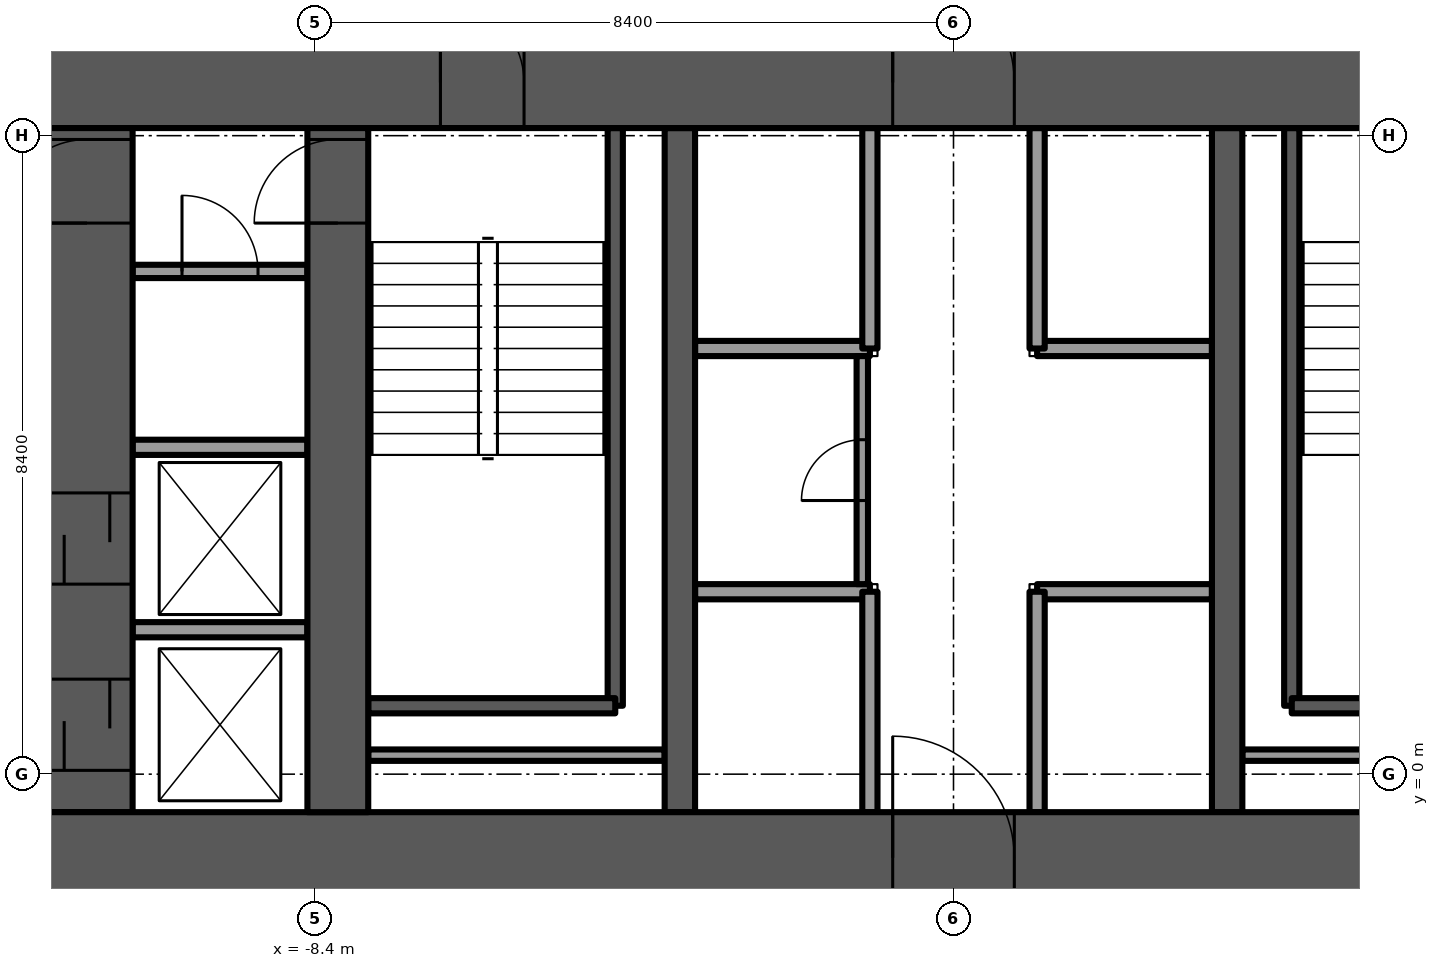
"""IFC4 building model, lengths in metres.
Left out: names, types, materials, properties, quantities, classifications, styles, units other than length and angle.
Written with IfcOpenShell. Run it as: python <this file> out.ifc"""

import sys

from ifc_helpers import new_model, si_unit, direction, frame, frame_2d, origin, place, context, subcontext, project, spatial, rectangle, extrude, element, fill, save


model = new_model("IFC4")
c1 = context("Model", 3, precision=1e-05, world=origin(), true_north=direction((0.0, 1.0)))
c2 = subcontext(c1, "Body", "Model", "MODEL_VIEW")
j1 = project(units=[si_unit("LENGTHUNIT", "METRE"), si_unit("PLANEANGLEUNIT", "RADIAN")], contexts=[c1])
p1 = place(None, origin())
s1 = spatial("IfcSite", under=j1, at=p1, CompositionType="ELEMENT")
p2 = place(p1, origin())
s2 = spatial("IfcBuilding", under=s1, at=p2, CompositionType="ELEMENT")
p3 = place(p2, frame((0.0, 0.0, 61.75)))
s3 = spatial("IfcBuildingStorey", under=s2, at=p3, CompositionType="ELEMENT", Elevation=61.75)
p4 = place(p3, frame((-12.0, -1.1, -0.3), z_axis=(0.0, 0.0, 1.0), x_axis=(1.0, 0.0, 0.0)))
e1 = element("IfcWall", 1, at=p4, inside=s3, PredefinedType="SHEAR", context=c2, shape_type="SweptSolid", body=[
    extrude(rectangle(XDim=24.0, YDim=1.2, at=frame_2d((12.0, 0.0))), origin(), (0.0, 0.0, 1.0), 3.75),
])
p5 = place(p4, frame((11.2, 0.0, 0.0)))
e2 = element("IfcOpeningElement", 2, at=p5, cuts=e1, PredefinedType="OPENING", context=c2, shape_type="SweptSolid", body=[
    extrude(rectangle(XDim=1.6, YDim=2.1, at=frame_2d((0.8, 1.05))), frame((0.0, 0.6, 0.0), z_axis=(0.0, -1.0, 0.0), x_axis=(1.0, 0.0, 0.0)), (0.0, 0.0, 1.0), 1.2),
])
p6 = place(p3, frame((-12.0, 9.1, -0.3), z_axis=(0.0, 0.0, 1.0), x_axis=(1.0, 0.0, 0.0)))
e3 = element("IfcWall", 3, at=p6, inside=s3, PredefinedType="SHEAR", context=c2, shape_type="SweptSolid", body=[
    extrude(rectangle(XDim=24.0, YDim=1.2, at=frame_2d((12.0, 0.0))), origin(), (0.0, 0.0, 1.0), 3.75),
])
p7 = place(p6, frame((11.2, 0.0, 0.0)))
e4 = element("IfcOpeningElement", 4, at=p7, cuts=e3, PredefinedType="OPENING", context=c2, shape_type="SweptSolid", body=[
    extrude(rectangle(XDim=1.6, YDim=2.1, at=frame_2d((0.8, 1.05))), frame((0.0, 0.6, 0.0), z_axis=(0.0, -1.0, 0.0), x_axis=(1.0, 0.0, 0.0)), (0.0, 0.0, 1.0), 1.2),
])
p8 = place(p6, frame((5.25, 0.0, 0.0)))
e5 = element("IfcOpeningElement", 5, at=p8, cuts=e3, PredefinedType="OPENING", context=c2, shape_type="SweptSolid", body=[
    extrude(rectangle(XDim=1.1, YDim=2.1, at=frame_2d((0.55, 1.05))), frame((0.0, 0.6, 0.0), z_axis=(0.0, -1.0, 0.0), x_axis=(1.0, 0.0, 0.0)), (0.0, 0.0, 1.0), 1.2),
])
p9 = place(p6, frame((17.65, 0.0, 0.0)))
e6 = element("IfcOpeningElement", 6, at=p9, cuts=e3, PredefinedType="OPENING", context=c2, shape_type="SweptSolid", body=[
    extrude(rectangle(XDim=1.1, YDim=2.1, at=frame_2d((0.55, 1.05))), frame((0.0, 0.6, 0.0), z_axis=(0.0, -1.0, 0.0), x_axis=(1.0, 0.0, 0.0)), (0.0, 0.0, 1.0), 1.2),
])
p10 = place(p3, frame((-8.1, -0.5, -0.3), z_axis=(0.0, 0.0, 1.0), x_axis=(0.0, 1.0, 0.0)))
e7 = element("IfcWall", 7, at=p10, inside=s3, PredefinedType="SHEAR", context=c2, shape_type="SweptSolid", body=[
    extrude(rectangle(XDim=9.0, YDim=0.8, at=frame_2d((4.5, 0.0))), origin(), (0.0, 0.0, 1.0), 3.75),
])
p11 = place(p10, frame((7.75, 0.0, 0.0)))
e8 = element("IfcOpeningElement", 8, at=p11, cuts=e7, PredefinedType="OPENING", context=c2, shape_type="SweptSolid", body=[
    extrude(rectangle(XDim=1.1, YDim=2.1, at=frame_2d((0.55, 1.05))), frame((0.0, 0.4, 0.0), z_axis=(0.0, -1.0, 0.0), x_axis=(1.0, 0.0, 0.0)), (0.0, 0.0, 1.0), 0.8),
])
for number, where, z_axis, x_axis in (
    (9, (-3.6, -0.5, -0.3), (0.0, 0.0, 1.0), (0.0, 1.0, 0.0)),
    (10, (3.6, -0.5, -0.3), (0.0, 0.0, 1.0), (0.0, 1.0, 0.0)),
):
    element("IfcWall", number, at=place(p3, frame(where, z_axis=z_axis, x_axis=x_axis)), inside=s3, PredefinedType="SHEAR", context=c2, shape_type="SweptSolid", body=[
        extrude(rectangle(XDim=9.0, YDim=0.4, at=frame_2d((4.5, 0.0))), origin(), (0.0, 0.0, 1.0), 3.75),
    ])
p12 = place(p3, frame((-11.4, -0.5, -0.3), z_axis=(0.0, 0.0, 1.0), x_axis=(0.0, 1.0, 0.0)))
e11 = element("IfcWall", 11, at=p12, inside=s3, PredefinedType="SHEAR", context=c2, shape_type="SweptSolid", body=[
    extrude(rectangle(XDim=9.0, YDim=1.2, at=frame_2d((4.5, 0.0))), origin(), (0.0, 0.0, 1.0), 3.75),
])
p13 = place(p12, frame((7.75, 0.0, 0.0)))
e12 = element("IfcOpeningElement", 12, at=p13, cuts=e11, PredefinedType="OPENING", context=c2, shape_type="SweptSolid", body=[
    extrude(rectangle(XDim=1.1, YDim=2.1, at=frame_2d((0.55, 1.05))), frame((0.0, 0.6, 0.0), z_axis=(0.0, -1.0, 0.0), x_axis=(1.0, 0.0, 0.0)), (0.0, 0.0, 1.0), 1.2),
])
p14 = place(p12, frame((0.55, 0.0, 0.0)))
e13 = element("IfcOpeningElement", 13, at=p14, cuts=e11, PredefinedType="OPENING", context=c2, shape_type="SweptSolid", body=[
    extrude(rectangle(XDim=1.2, YDim=2.1, at=frame_2d((0.6, 1.05))), frame((0.0, 0.6, 0.0), z_axis=(0.0, -1.0, 0.0), x_axis=(1.0, 0.0, 0.0)), (0.0, 0.0, 1.0), 1.2),
])
p15 = place(p12, frame((3.0, 0.0, 0.0)))
e14 = element("IfcOpeningElement", 14, at=p15, cuts=e11, PredefinedType="OPENING", context=c2, shape_type="SweptSolid", body=[
    extrude(rectangle(XDim=1.2, YDim=2.1, at=frame_2d((0.6, 1.05))), frame((0.0, 0.6, 0.0), z_axis=(0.0, -1.0, 0.0), x_axis=(1.0, 0.0, 0.0)), (0.0, 0.0, 1.0), 1.2),
])
p16 = place(p3, frame((-8.709, 20.292, 0.0), z_axis=(0.0, 0.0, 1.0), x_axis=(-0.500005515081, -0.866022219628, 0.0)))
e15 = element("IfcWall", 15, at=p16, inside=s3, PredefinedType="SOLIDWALL", context=c2, shape_type="SweptSolid", body=[
    extrude(rectangle(XDim=23.667, YDim=0.15, at=frame_2d((11.833, 0.0))), origin(), (0.0, 0.0, 1.0), 3.45),
])
p17 = place(p16, frame((3.825, 0.0, 0.15)))
e16 = element("IfcOpeningElement", 16, at=p17, cuts=e15, PredefinedType="OPENING", context=c2, shape_type="SweptSolid", body=[
    extrude(rectangle(XDim=1.5, YDim=2.85, at=frame_2d((0.75, 1.425))), frame((0.0, 0.075, 0.0), z_axis=(0.0, -1.0, 0.0), x_axis=(1.0, 0.0, 0.0)), (0.0, 0.0, 1.0), 0.15),
])
p18 = place(p16, frame((7.219, 0.0, 0.15)))
e17 = element("IfcOpeningElement", 17, at=p18, cuts=e15, PredefinedType="OPENING", context=c2, shape_type="SweptSolid", body=[
    extrude(rectangle(XDim=0.9, YDim=2.85, at=frame_2d((0.45, 1.425))), frame((0.0, 0.075, 0.0), z_axis=(0.0, -1.0, 0.0), x_axis=(1.0, 0.0, 0.0)), (0.0, 0.0, 1.0), 0.15),
])
p19 = place(p16, frame((8.254, 0.0, 0.15)))
e18 = element("IfcOpeningElement", 18, at=p19, cuts=e15, PredefinedType="OPENING", context=c2, shape_type="SweptSolid", body=[
    extrude(rectangle(XDim=1.5, YDim=2.85, at=frame_2d((0.75, 1.425))), frame((0.0, 0.075, 0.0), z_axis=(0.0, -1.0, 0.0), x_axis=(1.0, 0.0, 0.0)), (0.0, 0.0, 1.0), 0.15),
])
p20 = place(p16, frame((11.419, 0.0, 0.15)))
e19 = element("IfcOpeningElement", 19, at=p20, cuts=e15, PredefinedType="OPENING", context=c2, shape_type="SweptSolid", body=[
    extrude(rectangle(XDim=1.8, YDim=2.85, at=frame_2d((0.9, 1.425))), frame((0.0, 0.075, 0.0), z_axis=(0.0, -1.0, 0.0), x_axis=(1.0, 0.0, 0.0)), (0.0, 0.0, 1.0), 0.15),
])
p21 = place(p16, frame((13.519, 0.0, 0.15)))
e20 = element("IfcOpeningElement", 20, at=p21, cuts=e15, PredefinedType="OPENING", context=c2, shape_type="SweptSolid", body=[
    extrude(rectangle(XDim=1.5, YDim=2.85, at=frame_2d((0.75, 1.425))), frame((0.0, 0.075, 0.0), z_axis=(0.0, -1.0, 0.0), x_axis=(1.0, 0.0, 0.0)), (0.0, 0.0, 1.0), 0.15),
])
p22 = place(p16, frame((15.63, 0.0, 0.0)))
e21 = element("IfcOpeningElement", 21, at=p22, cuts=e15, PredefinedType="OPENING", context=c2, shape_type="SweptSolid", body=[
    extrude(rectangle(XDim=1.5, YDim=2.4, at=frame_2d((0.75, 1.2))), frame((0.0, 0.075, 0.0), z_axis=(0.0, -1.0, 0.0), x_axis=(1.0, 0.0, 0.0)), (0.0, 0.0, 1.0), 0.15),
])
p23 = place(p16, frame((0.41, 0.0, 0.15)))
e22 = element("IfcOpeningElement", 22, at=p23, cuts=e15, PredefinedType="OPENING", context=c2, shape_type="SweptSolid", body=[
    extrude(rectangle(XDim=1.8, YDim=2.73, at=frame_2d((0.9, 1.365))), frame((0.0, 0.075, 0.0), z_axis=(0.0, -1.0, 0.0), x_axis=(1.0, 0.0, 0.0)), (0.0, 0.0, 1.0), 0.15),
])
p24 = place(p16, frame((20.743, 0.0, 0.15)))
e23 = element("IfcOpeningElement", 23, at=p24, cuts=e15, PredefinedType="OPENING", context=c2, shape_type="SweptSolid", body=[
    extrude(rectangle(XDim=1.8, YDim=2.73, at=frame_2d((0.9, 1.365))), frame((0.0, 0.075, 0.0), z_axis=(0.0, -1.0, 0.0), x_axis=(1.0, 0.0, 0.0)), (0.0, 0.0, 1.0), 0.15),
])
p25 = place(p3, frame((-20.543, -1.269, 0.0), z_axis=(0.0, 0.0, 1.0), x_axis=(0.499995095024, -0.866028235655, 0.0)))
e24 = element("IfcWall", 24, at=p25, inside=s3, PredefinedType="SOLIDWALL", context=c2, shape_type="SweptSolid", body=[
    extrude(rectangle(XDim=18.345, YDim=0.15, at=frame_2d((9.172, 0.0))), origin(), (0.0, 0.0, 1.0), 3.45),
])
p26 = place(p25, frame((1.073, 0.0, 0.15)))
e25 = element("IfcOpeningElement", 25, at=p26, cuts=e24, PredefinedType="OPENING", context=c2, shape_type="SweptSolid", body=[
    extrude(rectangle(XDim=0.9, YDim=2.85, at=frame_2d((0.45, 1.425))), frame((0.0, 0.075, 0.0), z_axis=(0.0, -1.0, 0.0), x_axis=(1.0, 0.0, 0.0)), (0.0, 0.0, 1.0), 0.15),
])
p27 = place(p25, frame((3.172, 0.0, 0.15)))
e26 = element("IfcOpeningElement", 26, at=p27, cuts=e24, PredefinedType="OPENING", context=c2, shape_type="SweptSolid", body=[
    extrude(rectangle(XDim=1.5, YDim=2.85, at=frame_2d((0.75, 1.425))), frame((0.0, 0.075, 0.0), z_axis=(0.0, -1.0, 0.0), x_axis=(1.0, 0.0, 0.0)), (0.0, 0.0, 1.0), 0.15),
])
p28 = place(p25, frame((5.272, 0.0, 0.15)))
e27 = element("IfcOpeningElement", 27, at=p28, cuts=e24, PredefinedType="OPENING", context=c2, shape_type="SweptSolid", body=[
    extrude(rectangle(XDim=1.8, YDim=2.85, at=frame_2d((0.9, 1.425))), frame((0.0, 0.075, 0.0), z_axis=(0.0, -1.0, 0.0), x_axis=(1.0, 0.0, 0.0)), (0.0, 0.0, 1.0), 0.15),
])
p29 = place(p25, frame((7.372, 0.0, 0.15)))
e28 = element("IfcOpeningElement", 28, at=p29, cuts=e24, PredefinedType="OPENING", context=c2, shape_type="SweptSolid", body=[
    extrude(rectangle(XDim=1.5, YDim=2.85, at=frame_2d((0.75, 1.425))), frame((0.0, 0.075, 0.0), z_axis=(0.0, -1.0, 0.0), x_axis=(1.0, 0.0, 0.0)), (0.0, 0.0, 1.0), 0.15),
])
p30 = place(p25, frame((9.472, 0.0, 0.15)))
e29 = element("IfcOpeningElement", 29, at=p30, cuts=e24, PredefinedType="OPENING", context=c2, shape_type="SweptSolid", body=[
    extrude(rectangle(XDim=1.8, YDim=2.85, at=frame_2d((0.9, 1.425))), frame((0.0, 0.075, 0.0), z_axis=(0.0, -1.0, 0.0), x_axis=(1.0, 0.0, 0.0)), (0.0, 0.0, 1.0), 0.15),
])
p31 = place(p25, frame((11.573, 0.0, 0.15)))
e30 = element("IfcOpeningElement", 30, at=p31, cuts=e24, PredefinedType="OPENING", context=c2, shape_type="SweptSolid", body=[
    extrude(rectangle(XDim=1.5, YDim=2.85, at=frame_2d((0.75, 1.425))), frame((0.0, 0.075, 0.0), z_axis=(0.0, -1.0, 0.0), x_axis=(1.0, 0.0, 0.0)), (0.0, 0.0, 1.0), 0.15),
])
p32 = place(p25, frame((13.672, 0.0, 0.15)))
e31 = element("IfcOpeningElement", 31, at=p32, cuts=e24, PredefinedType="OPENING", context=c2, shape_type="SweptSolid", body=[
    extrude(rectangle(XDim=1.8, YDim=2.85, at=frame_2d((0.9, 1.425))), frame((0.0, 0.075, 0.0), z_axis=(0.0, -1.0, 0.0), x_axis=(1.0, 0.0, 0.0)), (0.0, 0.0, 1.0), 0.15),
])
p33 = place(p25, frame((15.772, 0.0, 0.15)))
e32 = element("IfcOpeningElement", 32, at=p33, cuts=e24, PredefinedType="OPENING", context=c2, shape_type="SweptSolid", body=[
    extrude(rectangle(XDim=1.5, YDim=2.85, at=frame_2d((0.75, 1.425))), frame((0.0, 0.075, 0.0), z_axis=(0.0, -1.0, 0.0), x_axis=(1.0, 0.0, 0.0)), (0.0, 0.0, 1.0), 0.15),
])
for number, where, z_axis, x_axis in (
    (33, (-3.4, 2.4, 0.0), (0.0, 0.0, 1.0), (1.0, 0.0, 0.0)),
    (34, (-3.4, 5.6, 0.0), (0.0, 0.0, 1.0), (1.0, 0.0, 0.0)),
    (35, (1.1, 2.4, 0.0), (0.0, 0.0, 1.0), (1.0, 0.0, 0.0)),
    (36, (1.1, 5.6, 0.0), (0.0, 0.0, 1.0), (1.0, 0.0, 0.0)),
):
    element("IfcWall", number, at=place(p3, frame(where, z_axis=z_axis, x_axis=x_axis)), inside=s3, PredefinedType="PARTITIONING", context=c2, shape_type="SweptSolid", body=[
        extrude(rectangle(XDim=2.3, YDim=0.2, at=frame_2d((1.15, 0.0))), origin(), (0.0, 0.0, 1.0), 3.45),
    ])
for number, where, z_axis, x_axis in (
    (37, (-1.1, -0.5, 0.0), (0.0, 0.0, 1.0), (0.0, 1.0, 0.0)),
    (38, (1.1, -0.5, 0.0), (0.0, 0.0, 1.0), (0.0, 1.0, 0.0)),
    (39, (-1.1, 5.6, 0.0), (0.0, 0.0, 1.0), (0.0, 1.0, 0.0)),
    (40, (1.1, 5.6, 0.0), (0.0, 0.0, 1.0), (0.0, 1.0, 0.0)),
):
    element("IfcWall", number, at=place(p3, frame(where, z_axis=z_axis, x_axis=x_axis)), inside=s3, PredefinedType="PARTITIONING", context=c2, shape_type="SweptSolid", body=[
        extrude(rectangle(XDim=2.9, YDim=0.2, at=frame_2d((1.45, 0.0))), origin(), (0.0, 0.0, 1.0), 3.45),
    ])
p34 = place(p3, frame((-4.45, 0.9, -0.3), z_axis=(0.0, 0.0, 1.0), x_axis=(0.0, 1.0, 0.0)))
e41 = element("IfcWall", 41, at=p34, inside=s3, PredefinedType="SOLIDWALL", context=c2, shape_type="SweptSolid", body=[
    extrude(rectangle(XDim=7.6, YDim=0.2, at=frame_2d((3.8, 0.0))), origin(), (0.0, 0.0, 1.0), 3.75),
])
p35 = place(p3, frame((-7.7, 0.9, -0.3), z_axis=(0.0, 0.0, 1.0), x_axis=(1.0, 0.0, 0.0)))
e42 = element("IfcWall", 42, at=p35, inside=s3, PredefinedType="SOLIDWALL", context=c2, shape_type="SweptSolid", body=[
    extrude(rectangle(XDim=3.25, YDim=0.2, at=frame_2d((1.625, 0.0))), origin(), (0.0, 0.0, 1.0), 3.75),
])
p36 = place(p3, frame((-7.7, 0.25, 0.0), z_axis=(0.0, 0.0, 1.0), x_axis=(1.0, 0.0, 0.0)))
e43 = element("IfcWall", 43, at=p36, inside=s3, PredefinedType="PARTITIONING", context=c2, shape_type="SweptSolid", body=[
    extrude(rectangle(XDim=3.9, YDim=0.15, at=frame_2d((1.95, 0.0))), origin(), (0.0, 0.0, 1.0), 3.45),
])
p37 = place(p3, frame((4.45, 0.9, -0.3), z_axis=(0.0, 0.0, 1.0), x_axis=(0.0, 1.0, 0.0)))
e44 = element("IfcWall", 44, at=p37, inside=s3, PredefinedType="SOLIDWALL", context=c2, shape_type="SweptSolid", body=[
    extrude(rectangle(XDim=7.6, YDim=0.2, at=frame_2d((3.8, 0.0))), origin(), (0.0, 0.0, 1.0), 3.75),
])
p38 = place(p3, frame((4.45, 0.9, -0.3), z_axis=(0.0, 0.0, 1.0), x_axis=(1.0, 0.0, 0.0)))
e45 = element("IfcWall", 45, at=p38, inside=s3, PredefinedType="SOLIDWALL", context=c2, shape_type="SweptSolid", body=[
    extrude(rectangle(XDim=3.25, YDim=0.2, at=frame_2d((1.625, 0.0))), origin(), (0.0, 0.0, 1.0), 3.75),
])
p39 = place(p3, frame((3.8, 0.25, 0.0), z_axis=(0.0, 0.0, 1.0), x_axis=(1.0, 0.0, 0.0)))
e46 = element("IfcWall", 46, at=p39, inside=s3, PredefinedType="PARTITIONING", context=c2, shape_type="SweptSolid", body=[
    extrude(rectangle(XDim=3.9, YDim=0.15, at=frame_2d((1.95, 0.0))), origin(), (0.0, 0.0, 1.0), 3.45),
])
p40 = place(p3, frame((-1.2, 2.5, 0.0), z_axis=(0.0, 0.0, 1.0), x_axis=(0.0, 1.0, 0.0)))
e47 = element("IfcWall", 47, at=p40, inside=s3, PredefinedType="PARTITIONING", context=c2, shape_type="SweptSolid", body=[
    extrude(rectangle(XDim=3.0, YDim=0.15, at=frame_2d((1.5, 0.0))), origin(), (0.0, 0.0, 1.0), 3.45),
])
p41 = place(p40, frame((1.1, 0.0, 0.0)))
e48 = element("IfcOpeningElement", 48, at=p41, cuts=e47, PredefinedType="OPENING", context=c2, shape_type="SweptSolid", body=[
    extrude(rectangle(XDim=0.8, YDim=2.1, at=frame_2d((0.4, 1.05))), frame((0.0, 0.075, 0.0), z_axis=(0.0, -1.0, 0.0), x_axis=(1.0, 0.0, 0.0)), (0.0, 0.0, 1.0), 0.15),
])
for number, where, z_axis, x_axis in (
    (49, (-10.8, 1.9, 0.0), (0.0, 0.0, 1.0), (1.0, 0.0, 0.0)),
    (50, (-10.8, 4.3, 0.0), (0.0, 0.0, 1.0), (1.0, 0.0, 0.0)),
):
    element("IfcWall", number, at=place(p3, frame(where, z_axis=z_axis, x_axis=x_axis)), inside=s3, PredefinedType="PARTITIONING", context=c2, shape_type="SweptSolid", body=[
        extrude(rectangle(XDim=2.3, YDim=0.2, at=frame_2d((1.15, 0.0))), origin(), (0.0, 0.0, 1.0), 3.45),
    ])
p42 = place(p3, frame((-10.8, 6.614, 0.0), z_axis=(0.0, 0.0, 1.0), x_axis=(1.0, 0.0, 0.0)))
e51 = element("IfcWall", 51, at=p42, inside=s3, PredefinedType="PARTITIONING", context=c2, shape_type="SweptSolid", body=[
    extrude(rectangle(XDim=2.3, YDim=0.175, at=frame_2d((1.15, 0.0))), origin(), (0.0, 0.0, 1.0), 3.45),
])
p43 = place(p42, frame((0.65, 0.0, 0.0)))
e52 = element("IfcOpeningElement", 52, at=p43, cuts=e51, PredefinedType="OPENING", context=c2, shape_type="SweptSolid", body=[
    extrude(rectangle(XDim=1.0, YDim=2.1, at=frame_2d((0.5, 1.05))), frame((0.0, 0.087, 0.0), z_axis=(0.0, -1.0, 0.0), x_axis=(1.0, 0.0, 0.0)), (0.0, 0.0, 1.0), 0.175),
])
p44 = place(p5, origin())
e53 = element("IfcDoor", 53, at=p44, inside=s3, OperationType="DOUBLE_DOOR_SINGLE_SWING", PredefinedType="DOOR", context=c2, shape_type="SweptSolid", body=[
    extrude(rectangle(XDim=1.6, YDim=2.1, at=frame_2d((0.8, 1.05))), frame((0.0, 0.025, 0.0), z_axis=(0.0, -1.0, 0.0), x_axis=(1.0, 0.0, 0.0)), (0.0, 0.0, 1.0), 0.05),
])
fill(e2, e53)
p45 = place(p7, origin())
e54 = element("IfcDoor", 54, at=p45, inside=s3, OperationType="DOUBLE_DOOR_SINGLE_SWING", PredefinedType="DOOR", context=c2, shape_type="SweptSolid", body=[
    extrude(rectangle(XDim=1.6, YDim=2.1, at=frame_2d((0.8, 1.05))), frame((0.0, 0.025, 0.0), z_axis=(0.0, -1.0, 0.0), x_axis=(1.0, 0.0, 0.0)), (0.0, 0.0, 1.0), 0.05),
])
fill(e4, e54)
p46 = place(p8, origin())
e55 = element("IfcDoor", 55, at=p46, inside=s3, OperationType="SINGLE_SWING_LEFT", PredefinedType="DOOR", context=c2, shape_type="SweptSolid", body=[
    extrude(rectangle(XDim=1.1, YDim=2.1, at=frame_2d((0.55, 1.05))), frame((0.0, 0.025, 0.0), z_axis=(0.0, -1.0, 0.0), x_axis=(1.0, 0.0, 0.0)), (0.0, 0.0, 1.0), 0.05),
])
fill(e5, e55)
p47 = place(p11, origin())
e56 = element("IfcDoor", 56, at=p47, inside=s3, OperationType="SINGLE_SWING_RIGHT", PredefinedType="DOOR", context=c2, shape_type="SweptSolid", body=[
    extrude(rectangle(XDim=1.1, YDim=2.1, at=frame_2d((0.55, 1.05))), frame((0.0, 0.025, 0.0), z_axis=(0.0, -1.0, 0.0), x_axis=(1.0, 0.0, 0.0)), (0.0, 0.0, 1.0), 0.05),
])
fill(e8, e56)
p48 = place(p41, origin())
e57 = element("IfcDoor", 57, at=p48, inside=s3, OperationType="SINGLE_SWING_LEFT", PredefinedType="DOOR", context=c2, shape_type="SweptSolid", body=[
    extrude(rectangle(XDim=0.8, YDim=2.1, at=frame_2d((0.4, 1.05))), frame((0.0, 0.025, 0.0), z_axis=(0.0, -1.0, 0.0), x_axis=(1.0, 0.0, 0.0)), (0.0, 0.0, 1.0), 0.05),
])
fill(e48, e57)
p49 = place(p43, origin())
e58 = element("IfcDoor", 58, at=p49, inside=s3, OperationType="SINGLE_SWING_LEFT", PredefinedType="DOOR", context=c2, shape_type="SweptSolid", body=[
    extrude(rectangle(XDim=1.0, YDim=2.1, at=frame_2d((0.5, 1.05))), frame((0.0, 0.025, 0.0), z_axis=(0.0, -1.0, 0.0), x_axis=(1.0, 0.0, 0.0)), (0.0, 0.0, 1.0), 0.05),
])
fill(e52, e58)
p50 = place(p13, origin())
e59 = element("IfcDoor", 59, at=p50, inside=s3, OperationType="SINGLE_SWING_LEFT", PredefinedType="DOOR", context=c2, shape_type="SweptSolid", body=[
    extrude(rectangle(XDim=1.1, YDim=2.1, at=frame_2d((0.55, 1.05))), frame((0.0, 0.025, 0.0), z_axis=(0.0, -1.0, 0.0), x_axis=(1.0, 0.0, 0.0)), (0.0, 0.0, 1.0), 0.05),
])
fill(e12, e59)
p51 = place(p14, origin())
e60 = element("IfcDoor", 60, at=p51, inside=s3, OperationType="SLIDING_TO_LEFT", PredefinedType="DOOR", context=c2, shape_type="SweptSolid", body=[
    extrude(rectangle(XDim=1.2, YDim=2.1, at=frame_2d((0.6, 1.05))), frame((0.0, 0.025, 0.0), z_axis=(0.0, -1.0, 0.0), x_axis=(1.0, 0.0, 0.0)), (0.0, 0.0, 1.0), 0.05),
])
fill(e13, e60)
p52 = place(p15, origin())
e61 = element("IfcDoor", 61, at=p52, inside=s3, OperationType="SLIDING_TO_LEFT", PredefinedType="DOOR", context=c2, shape_type="SweptSolid", body=[
    extrude(rectangle(XDim=1.2, YDim=2.1, at=frame_2d((0.6, 1.05))), frame((0.0, 0.025, 0.0), z_axis=(0.0, -1.0, 0.0), x_axis=(1.0, 0.0, 0.0)), (0.0, 0.0, 1.0), 0.05),
])
fill(e14, e61)
save(model, sys.argv[1])
